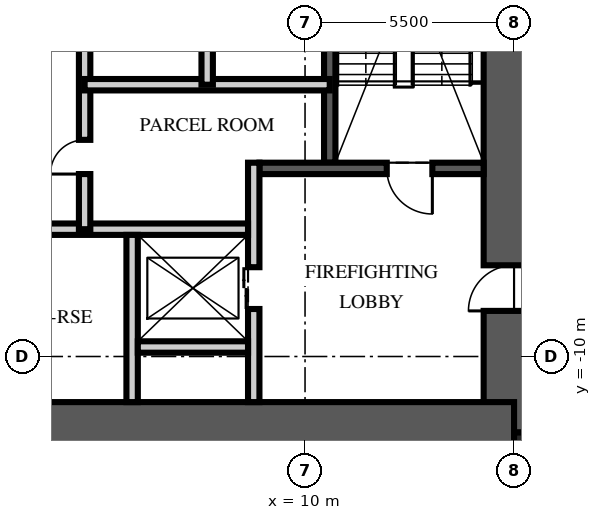
"""IFC4 building model, lengths in metres.
Left out: names, types, materials, properties, quantities, classifications, styles, units other than length and angle.
Written with IfcOpenShell. Run it as: python <this file> out.ifc"""

import sys

from ifc_helpers import new_model, si_unit, direction, frame, frame_2d, origin, origin_2d, place, context, subcontext, project, spatial, rectangle, extrude, element, fill, save


model = new_model("IFC4")
c1 = context("Model", 3, precision=1e-05, world=origin(), true_north=direction((0.0, 1.0)))
c2 = subcontext(c1, "Body", "Model", "MODEL_VIEW")
j1 = project(units=[si_unit("LENGTHUNIT", "METRE"), si_unit("PLANEANGLEUNIT", "RADIAN")], contexts=[c1])
p1 = place(None, origin())
s1 = spatial("IfcSite", under=j1, at=p1, CompositionType="ELEMENT")
p2 = place(p1, origin())
s2 = spatial("IfcBuilding", under=s1, at=p2, CompositionType="ELEMENT")
p3 = place(p2, frame((0.0, 0.0, 210.75)))
s3 = spatial("IfcBuildingStorey", under=s2, at=p3, CompositionType="ELEMENT", Elevation=210.75)
p4 = place(p3, frame((15.5, -12.0, -0.25), z_axis=(0.0, 0.0, 1.0), x_axis=(0.0, 1.0, 0.0)))
e1 = element("IfcWall", 1, at=p4, inside=s3, PredefinedType="SHEAR", context=c2, shape_type="SweptSolid", body=[
    extrude(rectangle(XDim=24.0, YDim=1.6, at=frame_2d((12.0, 0.0))), origin(), (0.0, 0.0, 1.0), 3.75),
])
p5 = place(p4, frame((3.2, 0.0, 0.25)))
e2 = element("IfcOpeningElement", 2, at=p5, cuts=e1, PredefinedType="OPENING", context=c2, shape_type="SweptSolid", body=[
    extrude(rectangle(XDim=1.2, YDim=2.1, at=frame_2d((0.6, 1.05))), frame((0.0, 0.81, 0.0), z_axis=(0.0, -1.0, 0.0), x_axis=(1.0, 0.0, 0.0)), (0.0, 0.0, 1.0), 1.62),
])
p6 = place(p4, frame((19.3, 0.0, 0.25)))
e3 = element("IfcOpeningElement", 3, at=p6, cuts=e1, PredefinedType="OPENING", context=c2, shape_type="SweptSolid", body=[
    extrude(rectangle(XDim=1.8, YDim=2.1, at=frame_2d((0.9, 1.05))), frame((0.0, 0.81, 0.0), z_axis=(0.0, -1.0, 0.0), x_axis=(1.0, 0.0, 0.0)), (0.0, 0.0, 1.0), 1.62),
])
p7 = place(p3, frame((-15.5, -12.0, -0.25), z_axis=(0.0, 0.0, 1.0), x_axis=(1.0, 0.0, 0.0)))
e4 = element("IfcWall", 4, at=p7, inside=s3, PredefinedType="SHEAR", context=c2, shape_type="SweptSolid", body=[
    extrude(rectangle(XDim=31.0, YDim=1.6, at=frame_2d((15.5, 0.0))), origin(), (0.0, 0.0, 1.0), 3.75),
])
p8 = place(p3, frame((15.9, -12.4, -0.25), z_axis=(0.0, 0.0, 1.0), x_axis=(1.0, 0.0, 0.0)))
e5 = element("IfcColumn", 5, at=p8, inside=s3, PredefinedType="COLUMN", context=c2, shape_type="SweptSolid", body=[
    extrude(rectangle(XDim=0.8, YDim=0.8, at=origin_2d()), origin(), (0.0, 0.0, 1.0), 3.75),
])
p9 = place(p3, frame((10.65, -4.9, 0.0), z_axis=(0.0, 0.0, 1.0), x_axis=(0.0, 1.0, 0.0)))
e6 = element("IfcWall", 6, at=p9, inside=s3, PredefinedType="SOLIDWALL", context=c2, shape_type="SweptSolid", body=[
    extrude(rectangle(XDim=10.1, YDim=0.3, at=frame_2d((5.05, 0.0))), origin(), (0.0, 0.0, 1.0), 3.5),
])
p10 = place(p3, frame((14.7, -5.05, 0.0), z_axis=(0.0, 0.0, 1.0), x_axis=(-1.0, 0.0, 0.0)))
e7 = element("IfcWall", 7, at=p10, inside=s3, PredefinedType="SOLIDWALL", context=c2, shape_type="SweptSolid", body=[
    extrude(rectangle(XDim=5.9, YDim=0.3, at=frame_2d((2.95, 0.0))), origin(), (0.0, 0.0, 1.0), 3.5),
])
p11 = place(p10, frame((1.35, 0.0, 0.0)))
e8 = element("IfcOpeningElement", 8, at=p11, cuts=e7, PredefinedType="OPENING", context=c2, shape_type="SweptSolid", body=[
    extrude(rectangle(XDim=1.2, YDim=2.1, at=frame_2d((0.6, 1.05))), frame((0.0, 0.16, 0.0), z_axis=(0.0, -1.0, 0.0), x_axis=(1.0, 0.0, 0.0)), (0.0, 0.0, 1.0), 0.32),
])
p12 = place(p3, frame((8.65, -11.2, 0.0), z_axis=(0.0, 0.0, 1.0), x_axis=(0.0, 1.0, 0.0)))
e9 = element("IfcWall", 9, at=p12, inside=s3, PredefinedType="PARTITIONING", context=c2, shape_type="SweptSolid", body=[
    extrude(rectangle(XDim=6.3, YDim=0.3, at=frame_2d((3.15, 0.0))), origin(), (0.0, 0.0, 1.0), 3.5),
])
p13 = place(p12, frame((2.45, 0.0, 0.0)))
e10 = element("IfcOpeningElement", 10, at=p13, cuts=e9, PredefinedType="OPENING", context=c2, shape_type="SweptSolid", body=[
    extrude(rectangle(XDim=1.1, YDim=2.1, at=frame_2d((0.55, 1.05))), frame((0.0, 0.16, 0.0), z_axis=(0.0, -1.0, 0.0), x_axis=(1.0, 0.0, 0.0)), (0.0, 0.0, 1.0), 0.32),
])
p14 = place(p3, frame((-8.5, -6.65, 0.0), z_axis=(0.0, 0.0, 1.0), x_axis=(1.0, 0.0, 0.0)))
e11 = element("IfcWall", 11, at=p14, inside=s3, PredefinedType="PARTITIONING", context=c2, shape_type="SweptSolid", body=[
    extrude(rectangle(XDim=17.0, YDim=0.3, at=frame_2d((8.5, 0.0))), origin(), (0.0, 0.0, 1.0), 3.5),
])
p15 = place(p14, frame((7.8, 0.0, 0.0)))
e12 = element("IfcOpeningElement", 12, at=p15, cuts=e11, PredefinedType="OPENING", context=c2, shape_type="SweptSolid", body=[
    extrude(rectangle(XDim=1.3, YDim=2.4, at=frame_2d((0.65, 1.2))), frame((0.0, 0.16, 0.0), z_axis=(0.0, -1.0, 0.0), x_axis=(1.0, 0.0, 0.0)), (0.0, 0.0, 1.0), 0.32),
])
p16 = place(p14, frame((5.65, 0.0, 0.0)))
e13 = element("IfcOpeningElement", 13, at=p16, cuts=e11, PredefinedType="OPENING", context=c2, shape_type="SweptSolid", body=[
    extrude(rectangle(XDim=0.9, YDim=2.1, at=frame_2d((0.45, 1.05))), frame((0.0, 0.16, 0.0), z_axis=(0.0, -1.0, 0.0), x_axis=(1.0, 0.0, 0.0)), (0.0, 0.0, 1.0), 0.32),
])
p17 = place(p14, frame((10.4, 0.0, 0.0)))
e14 = element("IfcOpeningElement", 14, at=p17, cuts=e11, PredefinedType="OPENING", context=c2, shape_type="SweptSolid", body=[
    extrude(rectangle(XDim=0.9, YDim=2.1, at=frame_2d((0.45, 1.05))), frame((0.0, 0.16, 0.0), z_axis=(0.0, -1.0, 0.0), x_axis=(1.0, 0.0, 0.0)), (0.0, 0.0, 1.0), 0.32),
])
p18 = place(p3, frame((5.45, -11.2, 0.0), z_axis=(0.0, 0.0, 1.0), x_axis=(0.0, 1.0, 0.0)))
e15 = element("IfcWall", 15, at=p18, inside=s3, PredefinedType="PARTITIONING", context=c2, shape_type="SweptSolid", body=[
    extrude(rectangle(XDim=4.4, YDim=0.3, at=frame_2d((2.2, 0.0))), origin(), (0.0, 0.0, 1.0), 3.5),
])
p19 = place(p3, frame((5.6, -9.75, 0.0), z_axis=(0.0, 0.0, 1.0), x_axis=(1.0, 0.0, 0.0)))
e16 = element("IfcWall", 16, at=p19, inside=s3, PredefinedType="PARTITIONING", context=c2, shape_type="SweptSolid", body=[
    extrude(rectangle(XDim=2.9, YDim=0.3, at=frame_2d((1.45, 0.0))), origin(), (0.0, 0.0, 1.0), 3.5),
])
p20 = place(p3, frame((4.2, -6.65, 0.0), z_axis=(0.0, 0.0, 1.0), x_axis=(0.0, 1.0, 0.0)))
e17 = element("IfcWall", 17, at=p20, inside=s3, PredefinedType="PARTITIONING", context=c2, shape_type="SweptSolid", body=[
    extrude(rectangle(XDim=8.45, YDim=0.3, at=frame_2d((4.225, 0.0))), origin(), (0.0, 0.0, 1.0), 3.5),
])
p21 = place(p20, frame((1.451, 0.0, 0.0)))
e18 = element("IfcOpeningElement", 18, at=p21, cuts=e17, PredefinedType="OPENING", context=c2, shape_type="SweptSolid", body=[
    extrude(rectangle(XDim=0.9, YDim=2.1, at=frame_2d((0.45, 1.05))), frame((0.0, 0.16, 0.0), z_axis=(0.0, -1.0, 0.0), x_axis=(1.0, 0.0, 0.0)), (0.0, 0.0, 1.0), 0.32),
])
p22 = place(p20, frame((5.676, 0.0, 0.0)))
e19 = element("IfcOpeningElement", 19, at=p22, cuts=e17, PredefinedType="OPENING", context=c2, shape_type="SweptSolid", body=[
    extrude(rectangle(XDim=0.9, YDim=2.1, at=frame_2d((0.45, 1.05))), frame((0.0, 0.16, 0.0), z_axis=(0.0, -1.0, 0.0), x_axis=(1.0, 0.0, 0.0)), (0.0, 0.0, 1.0), 0.32),
])
p23 = place(p3, frame((10.65, -2.848, 0.0), z_axis=(0.0, 0.0, 1.0), x_axis=(-1.0, 0.0, 0.0)))
e20 = element("IfcWall", 20, at=p23, inside=s3, PredefinedType="PARTITIONING", context=c2, shape_type="SweptSolid", body=[
    extrude(rectangle(XDim=6.45, YDim=0.3, at=frame_2d((3.225, 0.0))), origin(), (0.0, 0.0, 1.0), 3.5),
])
p24 = place(p3, frame((7.425, -2.848, 0.0), z_axis=(0.0, 0.0, 1.0), x_axis=(0.0, 1.0, 0.0)))
e21 = element("IfcWall", 21, at=p24, inside=s3, PredefinedType="PARTITIONING", context=c2, shape_type="SweptSolid", body=[
    extrude(rectangle(XDim=4.648, YDim=0.3, at=frame_2d((2.324, 0.0))), origin(), (0.0, 0.0, 1.0), 3.5),
])
p25 = place(p11, origin())
e22 = element("IfcDoor", 22, at=p25, inside=s3, OperationType="SINGLE_SWING_LEFT", PredefinedType="DOOR", context=c2, shape_type="SweptSolid", body=[
    extrude(rectangle(XDim=1.2, YDim=2.1, at=frame_2d((0.6, 1.05))), frame((0.0, 0.025, 0.0), z_axis=(0.0, -1.0, 0.0), x_axis=(1.0, 0.0, 0.0)), (0.0, 0.0, 1.0), 0.05),
])
fill(e8, e22)
p26 = place(p5, origin())
e23 = element("IfcDoor", 23, at=p26, inside=s3, OperationType="SINGLE_SWING_LEFT", PredefinedType="DOOR", context=c2, shape_type="SweptSolid", body=[
    extrude(rectangle(XDim=1.2, YDim=2.1, at=frame_2d((0.6, 1.05))), frame((0.0, 0.025, 0.0), z_axis=(0.0, -1.0, 0.0), x_axis=(1.0, 0.0, 0.0)), (0.0, 0.0, 1.0), 0.05),
])
fill(e2, e23)
p27 = place(p13, origin())
e24 = element("IfcDoor", 24, at=p27, inside=s3, OperationType="DOUBLE_DOOR_SLIDING", PredefinedType="DOOR", context=c2, shape_type="SweptSolid", body=[
    extrude(rectangle(XDim=1.1, YDim=2.1, at=frame_2d((0.55, 1.05))), frame((0.0, 0.025, 0.0), z_axis=(0.0, -1.0, 0.0), x_axis=(1.0, 0.0, 0.0)), (0.0, 0.0, 1.0), 0.05),
])
fill(e10, e24)
p28 = place(p21, origin())
e25 = element("IfcDoor", 25, at=p28, inside=s3, OperationType="SINGLE_SWING_LEFT", PredefinedType="DOOR", context=c2, shape_type="SweptSolid", body=[
    extrude(rectangle(XDim=0.9, YDim=2.1, at=frame_2d((0.45, 1.05))), frame((0.0, 0.025, 0.0), z_axis=(0.0, -1.0, 0.0), x_axis=(1.0, 0.0, 0.0)), (0.0, 0.0, 1.0), 0.05),
])
fill(e18, e25)
save(model, sys.argv[1])
